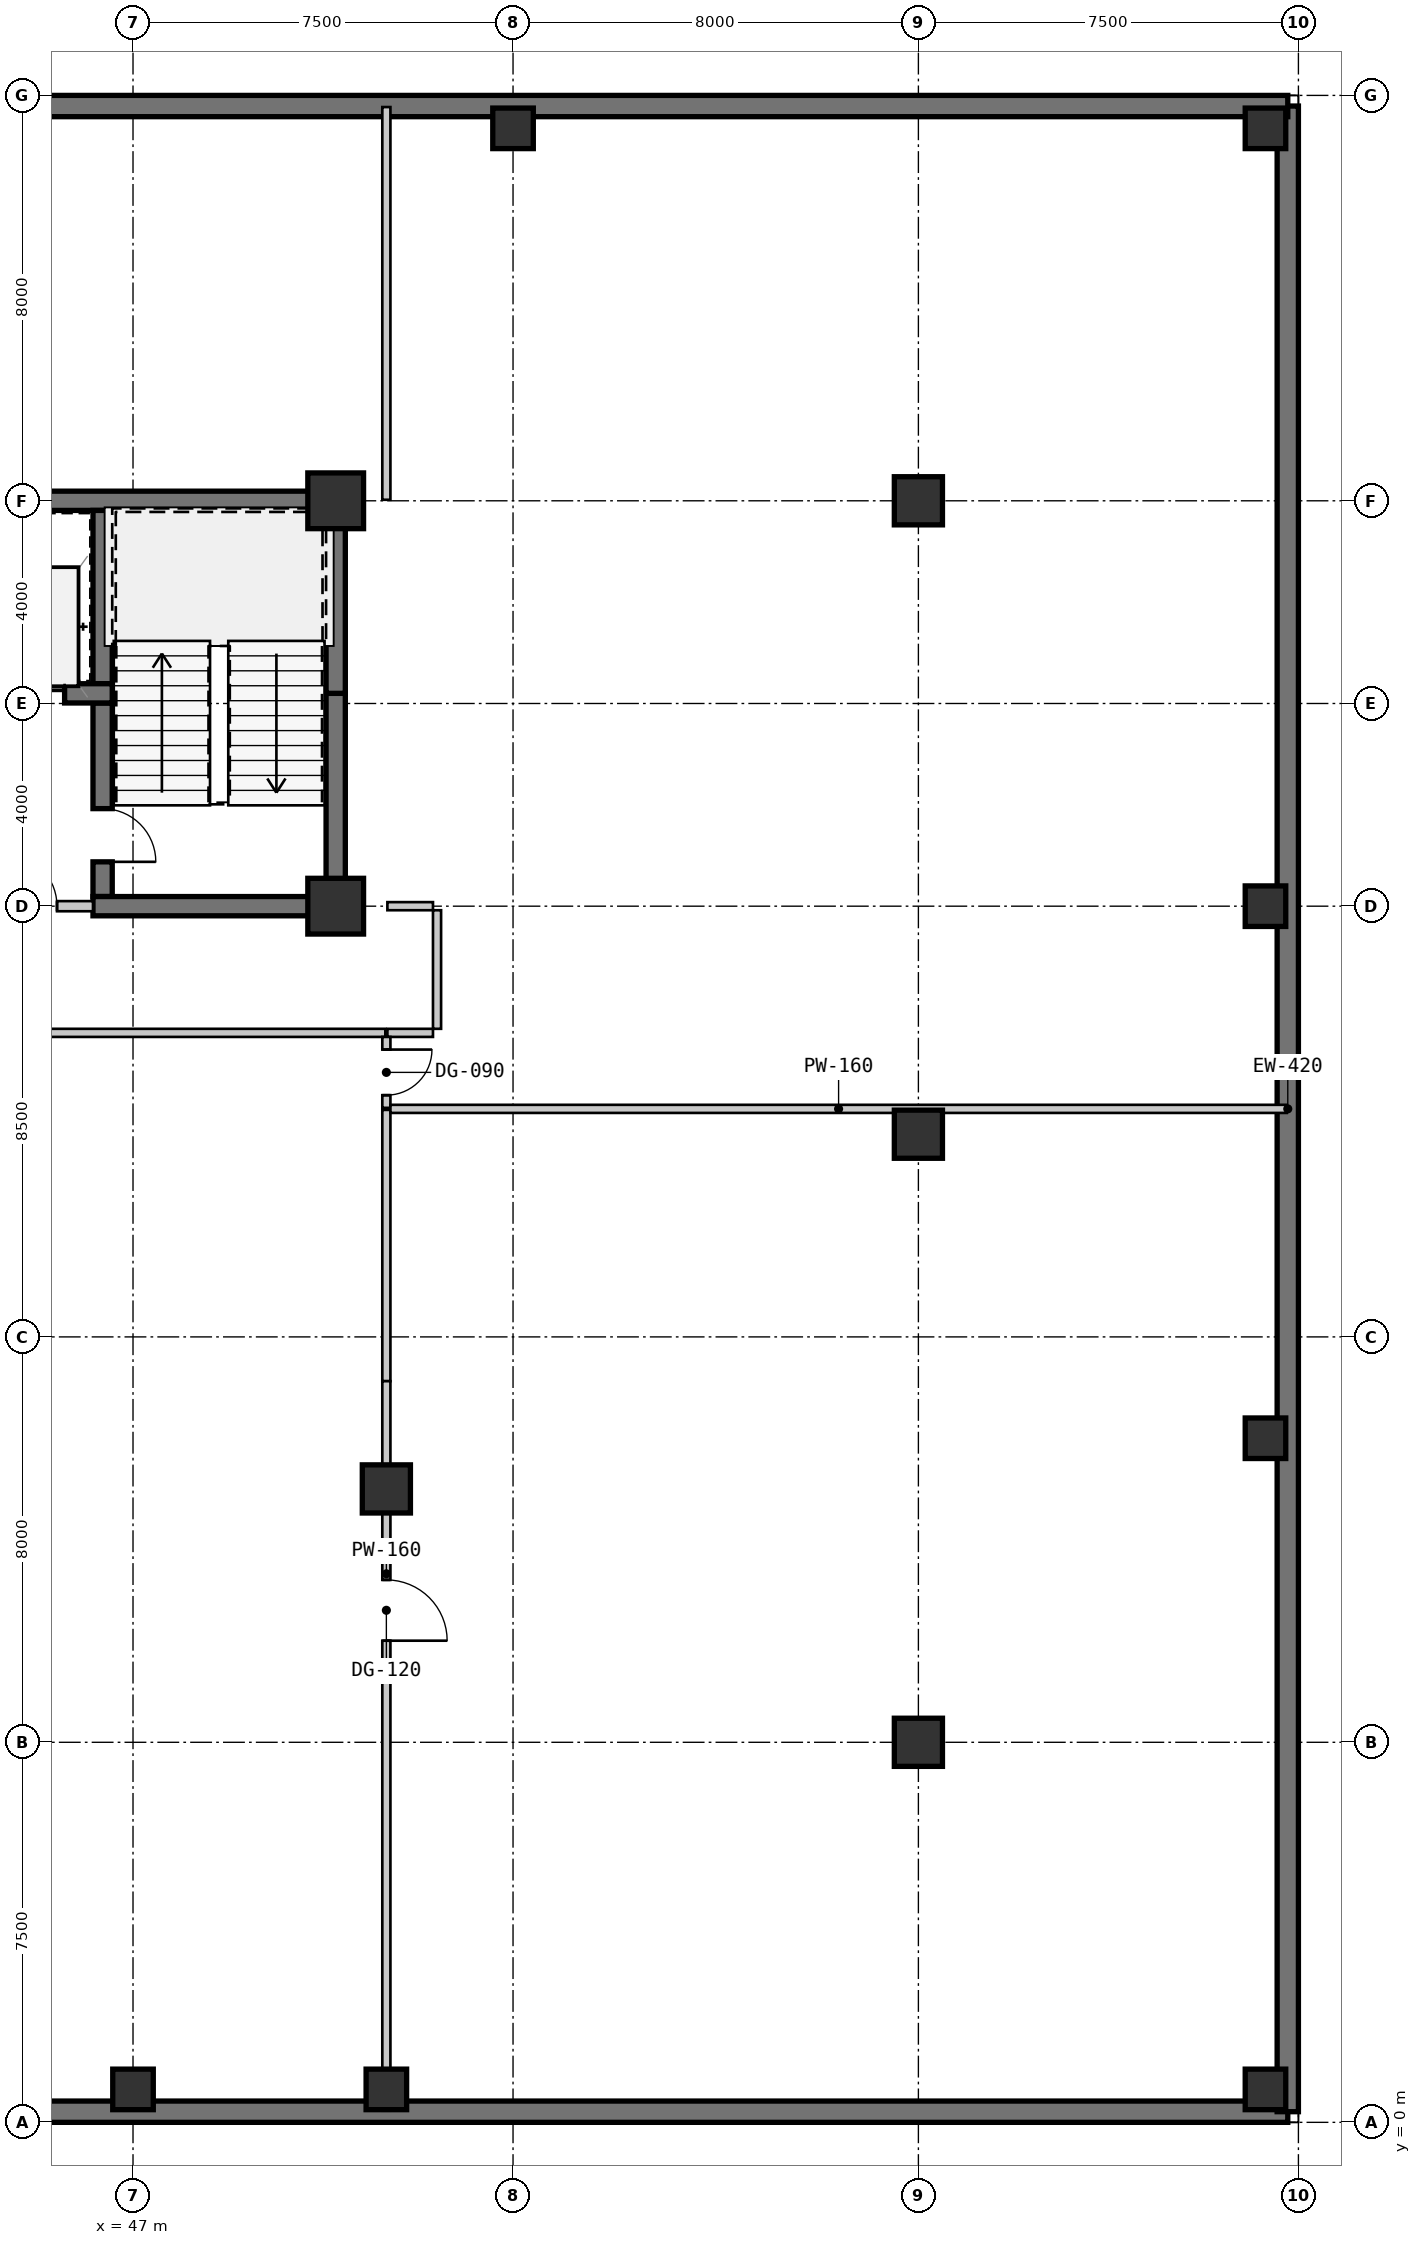
"""IFC4 building model, lengths in metres.
Left out: names, types, materials, properties, quantities, classifications, styles, units other than length and angle.
Written with IfcOpenShell. Run it as: python <this file> out.ifc"""

import sys

from ifc_helpers import new_model, si_unit, direction, frame, frame_2d, origin, origin_2d, place, context, subcontext, project, spatial, rectangle, extrude, source, transform, mapped, element, fill, save


model = new_model("IFC4")
c1 = context("Model", 3, precision=1e-05, world=origin(), true_north=direction((0.0, 1.0)))
c2 = subcontext(c1, "Body", "Model", "MODEL_VIEW")
j1 = project(units=[si_unit("LENGTHUNIT", "METRE"), si_unit("PLANEANGLEUNIT", "RADIAN")], contexts=[c1])
p1 = place(None, origin())
s1 = spatial("IfcSite", under=j1, at=p1, CompositionType="ELEMENT")
p2 = place(p1, origin())
s2 = spatial("IfcBuilding", under=s1, at=p2, CompositionType="ELEMENT")
p3 = place(p2, frame((0.0, 0.0, -4.0)))
s3 = spatial("IfcBuildingStorey", under=s2, at=p3, CompositionType="ELEMENT", Elevation=-4.0)
m1 = source(origin(), c2, "Body", "SweptSolid", [
    extrude(rectangle(XDim=1.1, YDim=1.1, at=origin_2d()), origin(), (0.0, 0.0, 1.0), 4.0),
])
for number, where, z_axis, x_axis in (
    (1, (51.0, 24.0, 0.0), (0.0, 0.0, 1.0), (1.0, 0.0, 0.0)),
    (2, (51.0, 32.0, 0.0), (0.0, 0.0, 1.0), (1.0, 0.0, 0.0)),
):
    element("IfcColumn", number, at=place(p3, frame(where, z_axis=z_axis, x_axis=x_axis)), inside=s3, PredefinedType="COLUMN", context=c2, shape_type="MappedRepresentation", body=[
        mapped(m1, transform((0.0, 0.0, 0.0), scale=1.0)),
    ])
m2 = source(origin(), c2, "Body", "SweptSolid", [
    extrude(rectangle(XDim=0.95, YDim=0.95, at=origin_2d()), origin(), (0.0, 0.0, 1.0), 4.0),
])
for number, where, z_axis, x_axis in (
    (3, (52.0, 12.5, 0.0), (0.0, 0.0, 1.0), (1.0, 0.0, 0.0)),
    (4, (62.5, 7.5, 0.0), (0.0, 0.0, 1.0), (1.0, 0.0, 0.0)),
    (5, (62.5, 19.5, 0.0), (0.0, 0.0, 1.0), (1.0, 0.0, 0.0)),
    (6, (62.5, 32.0, 0.0), (0.0, 0.0, 1.0), (1.0, 0.0, 0.0)),
):
    element("IfcColumn", number, at=place(p3, frame(where, z_axis=z_axis, x_axis=x_axis)), inside=s3, PredefinedType="COLUMN", context=c2, shape_type="MappedRepresentation", body=[
        mapped(m2, transform((0.0, 0.0, 0.0), scale=1.0)),
    ])
m3 = source(origin(), c2, "Body", "SweptSolid", [
    extrude(rectangle(XDim=0.8, YDim=0.8, at=origin_2d()), origin(), (0.0, 0.0, 1.0), 4.0),
])
for number, where, z_axis, x_axis in (
    (7, (69.35, 0.65, 0.0), (0.0, 0.0, 1.0), (1.0, 0.0, 0.0)),
    (8, (69.35, 13.5, 0.0), (0.0, 0.0, 1.0), (1.0, 0.0, 0.0)),
    (9, (69.35, 24.0, 0.0), (0.0, 0.0, 1.0), (1.0, 0.0, 0.0)),
    (10, (69.35, 39.35, 0.0), (0.0, 0.0, 1.0), (1.0, 0.0, 0.0)),
    (11, (47.0, 0.65, 0.0), (0.0, 0.0, 1.0), (1.0, 0.0, 0.0)),
    (12, (52.0, 0.65, 0.0), (0.0, 0.0, 1.0), (1.0, 0.0, 0.0)),
    (13, (54.5, 39.35, 0.0), (0.0, 0.0, 1.0), (1.0, 0.0, 0.0)),
):
    element("IfcColumn", number, at=place(p3, frame(where, z_axis=z_axis, x_axis=x_axis)), inside=s3, PredefinedType="COLUMN", context=c2, shape_type="MappedRepresentation", body=[
        mapped(m3, transform((0.0, 0.0, 0.0), scale=1.0)),
    ])
m4 = source(origin(), c2, "Body", "SweptSolid", [
    extrude(rectangle(XDim=69.58, YDim=0.42, at=frame_2d((34.79, 0.0))), origin(), (0.0, 0.0, 1.0), 3.74),
])
p4 = place(p3, frame((0.21, 0.21, 0.0), z_axis=(0.0, 0.0, 1.0), x_axis=(1.0, 0.0, 0.0)))
e14 = element("IfcWall", 14, at=p4, inside=s3, PredefinedType="SOLIDWALL", context=c2, shape_type="MappedRepresentation", body=[
    mapped(m4, transform((0.0, 0.0, 0.0), scale=1.0)),
])
m5 = source(origin(), c2, "Body", "SweptSolid", [
    extrude(rectangle(XDim=39.58, YDim=0.42, at=frame_2d((19.79, 0.0))), origin(), (0.0, 0.0, 1.0), 3.74),
])
p5 = place(p3, frame((69.79, 0.21, 0.0), z_axis=(0.0, 0.0, 1.0), x_axis=(0.0, 1.0, 0.0)))
e15 = element("IfcWall", 15, at=p5, inside=s3, PredefinedType="SOLIDWALL", context=c2, shape_type="MappedRepresentation", body=[
    mapped(m5, transform((0.0, 0.0, 0.0), scale=1.0)),
])
p6 = place(p3, frame((69.79, 39.79, 0.0), z_axis=(0.0, 0.0, 1.0), x_axis=(-1.0, 0.0, 0.0)))
e16 = element("IfcWall", 16, at=p6, inside=s3, PredefinedType="SOLIDWALL", context=c2, shape_type="MappedRepresentation", body=[
    mapped(m4, transform((0.0, 0.0, 0.0), scale=1.0)),
])
m6 = source(origin(), c2, "Body", "SweptSolid", [
    extrude(rectangle(XDim=11.99, YDim=0.38, at=frame_2d((5.995, 0.0))), origin(), (0.0, 0.0, 1.0), 3.74),
])
p7 = place(p3, frame((39.2, 32.0, 0.0), z_axis=(0.0, 0.0, 1.0), x_axis=(1.0, 0.0, 0.0)))
e17 = element("IfcWall", 17, at=p7, inside=s3, PredefinedType="SHEAR", context=c2, shape_type="MappedRepresentation", body=[
    mapped(m6, transform((0.0, 0.0, 0.0), scale=1.0)),
])
m7 = source(origin(), c2, "Body", "SweptSolid", [
    extrude(rectangle(XDim=4.01, YDim=0.38, at=frame_2d((2.005, 0.0))), origin(), (0.0, 0.0, 1.0), 3.74),
])
p8 = place(p3, frame((51.0, 24.19, 0.0), z_axis=(0.0, 0.0, 1.0), x_axis=(0.0, 1.0, 0.0)))
e18 = element("IfcWall", 18, at=p8, inside=s3, PredefinedType="SHEAR", context=c2, shape_type="MappedRepresentation", body=[
    mapped(m7, transform((0.0, 0.0, 0.0), scale=1.0)),
])
m8 = source(origin(), c2, "Body", "SweptSolid", [
    extrude(rectangle(XDim=3.61, YDim=0.38, at=frame_2d((1.805, 0.0))), origin(), (0.0, 0.0, 1.0), 3.74),
])
p9 = place(p3, frame((51.0, 28.2, 0.0), z_axis=(0.0, 0.0, 1.0), x_axis=(0.0, 1.0, 0.0)))
e19 = element("IfcWall", 19, at=p9, inside=s3, PredefinedType="SHEAR", context=c2, shape_type="MappedRepresentation", body=[
    mapped(m8, transform((0.0, 0.0, 0.0), scale=1.0)),
])
m9 = source(origin(), c2, "Body", "SweptSolid", [
    extrude(rectangle(XDim=3.42, YDim=0.38, at=frame_2d((1.71, 0.0))), origin(), (0.0, 0.0, 1.0), 3.74),
])
p10 = place(p3, frame((46.4, 31.81, 0.0), z_axis=(0.0, 0.0, 1.0), x_axis=(0.0, -1.0, 0.0)))
e20 = element("IfcWall", 20, at=p10, inside=s3, PredefinedType="SHEAR", context=c2, shape_type="MappedRepresentation", body=[
    mapped(m9, transform((0.0, 0.0, 0.0), scale=1.0)),
])
m10 = source(origin(), c2, "Body", "SweptSolid", [
    extrude(rectangle(XDim=3.82, YDim=0.38, at=frame_2d((1.91, 0.0))), origin(), (0.0, 0.0, 1.0), 3.74),
])
p11 = place(p3, frame((46.4, 28.01, 0.0), z_axis=(0.0, 0.0, 1.0), x_axis=(0.0, -1.0, 0.0)))
e21 = element("IfcWall", 21, at=p11, inside=s3, PredefinedType="SHEAR", context=c2, shape_type="MappedRepresentation", body=[
    mapped(m10, transform((0.0, 0.0, 0.0), scale=1.0)),
])
m11 = source(origin(), c2, "Body", "SweptSolid", [
    extrude(rectangle(XDim=1.05, YDim=2.1, at=frame_2d((0.525, 1.05))), frame((0.0, 0.2, 0.0), z_axis=(0.0, -1.0, 0.0), x_axis=(1.0, 0.0, 0.0)), (0.0, 0.0, 1.0), 0.4),
])
p12 = place(p11, frame((2.085, 0.0, 0.0)))
e22 = element("IfcOpeningElement", 22, at=p12, cuts=e21, PredefinedType="OPENING", context=c2, shape_type="MappedRepresentation", body=[
    mapped(m11, transform((0.0, 0.0, 0.0), scale=1.0)),
])
m12 = source(origin(), c2, "Body", "SweptSolid", [
    extrude(rectangle(XDim=4.98, YDim=0.38, at=frame_2d((2.49, 0.0))), origin(), (0.0, 0.0, 1.0), 3.74),
])
p13 = place(p3, frame((46.21, 24.0, 0.0), z_axis=(0.0, 0.0, 1.0), x_axis=(1.0, 0.0, 0.0)))
e23 = element("IfcWall", 23, at=p13, inside=s3, PredefinedType="SHEAR", context=c2, shape_type="MappedRepresentation", body=[
    mapped(m12, transform((0.0, 0.0, 0.0), scale=1.0)),
])
m13 = source(origin(), c2, "Body", "SweptSolid", [
    extrude(rectangle(XDim=2.98, YDim=0.38, at=frame_2d((1.49, 0.0))), origin(), (0.0, 0.0, 1.0), 3.74),
])
p14 = place(p3, frame((43.61, 28.2, 0.0), z_axis=(0.0, 0.0, 1.0), x_axis=(1.0, 0.0, 0.0)))
e24 = element("IfcWall", 24, at=p14, inside=s3, PredefinedType="SHEAR", context=c2, shape_type="MappedRepresentation", body=[
    mapped(m13, transform((0.0, 0.0, 0.0), scale=1.0)),
])
m14 = source(origin(), c2, "Body", "SweptSolid", [
    extrude(rectangle(XDim=1.1, YDim=2.15, at=frame_2d((0.55, 1.075))), frame((0.0, 0.2, 0.0), z_axis=(0.0, -1.0, 0.0), x_axis=(1.0, 0.0, 0.0)), (0.0, 0.0, 1.0), 0.4),
])
p15 = place(p14, frame((0.94, 0.0, 0.0)))
e25 = element("IfcOpeningElement", 25, at=p15, cuts=e24, PredefinedType="OPENING", context=c2, shape_type="MappedRepresentation", body=[
    mapped(m14, transform((0.0, 0.0, 0.0), scale=1.0)),
])
m15 = source(origin(), c2, "Body", "SweptSolid", [
    extrude(rectangle(XDim=2.66, YDim=0.2, at=frame_2d((1.33, 0.0))), origin(), (0.0, 0.0, 1.0), 3.207),
])
p16 = place(p3, frame((43.55, 24.0, 0.0), z_axis=(0.0, 0.0, 1.0), x_axis=(1.0, 0.0, 0.0)))
e26 = element("IfcWall", 26, at=p16, inside=s3, PredefinedType="SOLIDWALL", context=c2, shape_type="MappedRepresentation", body=[
    mapped(m15, transform((0.0, 0.0, 0.0), scale=1.0)),
])
m16 = source(origin(), c2, "Body", "SweptSolid", [
    extrude(rectangle(XDim=1.05, YDim=2.1, at=frame_2d((0.525, 1.05))), frame((0.0, 0.11, 0.0), z_axis=(0.0, -1.0, 0.0), x_axis=(1.0, 0.0, 0.0)), (0.0, 0.0, 1.0), 0.22),
])
p17 = place(p16, frame((0.9, 0.0, 0.0)))
e27 = element("IfcOpeningElement", 27, at=p17, cuts=e26, PredefinedType="OPENING", context=c2, shape_type="MappedRepresentation", body=[
    mapped(m16, transform((0.0, 0.0, 0.0), scale=1.0)),
])
m17 = source(origin(), c2, "Body", "SweptSolid", [
    extrude(rectangle(XDim=36.959, YDim=0.16, at=frame_2d((18.48, 0.0))), origin(), (0.0, 0.0, 1.0), 3.74),
])
p18 = place(p3, frame((51.98, 21.5, 0.0), z_axis=(0.0, 0.0, 1.0), x_axis=(-1.0, 0.0, 0.0)))
e28 = element("IfcWall", 28, at=p18, inside=s3, PredefinedType="PARTITIONING", context=c2, shape_type="MappedRepresentation", body=[
    mapped(m17, transform((0.0, 0.0, 0.0), scale=1.0)),
])
m18 = source(origin(), c2, "Body", "SweptSolid", [
    extrude(rectangle(XDim=1.05, YDim=2.1, at=frame_2d((0.525, 1.05))), frame((0.0, 0.09, 0.0), z_axis=(0.0, -1.0, 0.0), x_axis=(1.0, 0.0, 0.0)), (0.0, 0.0, 1.0), 0.18),
])
p19 = place(p18, frame((17.955, 0.0, 0.0)))
e29 = element("IfcOpeningElement", 29, at=p19, cuts=e28, PredefinedType="OPENING", context=c2, shape_type="MappedRepresentation", body=[
    mapped(m18, transform((0.0, 0.0, 0.0), scale=1.0)),
])
m19 = source(origin(), c2, "Body", "SweptSolid", [
    extrude(rectangle(XDim=2.34, YDim=0.16, at=frame_2d((1.17, 0.0))), origin(), (0.0, 0.0, 1.0), 3.74),
])
p20 = place(p3, frame((53.0, 23.92, 0.0), z_axis=(0.0, 0.0, 1.0), x_axis=(0.0, -1.0, 0.0)))
e30 = element("IfcWall", 30, at=p20, inside=s3, PredefinedType="PARTITIONING", context=c2, shape_type="MappedRepresentation", body=[
    mapped(m19, transform((0.0, 0.0, 0.0), scale=1.0)),
])
m20 = source(origin(), c2, "Body", "SweptSolid", [
    extrude(rectangle(XDim=0.9, YDim=0.16, at=frame_2d((0.45, 0.0))), origin(), (0.0, 0.0, 1.0), 3.74),
])
for number, where, z_axis, x_axis in (
    (31, (52.92, 21.5, 0.0), (0.0, 0.0, 1.0), (-1.0, 0.0, 0.0)),
    (32, (52.02, 24.0, 0.0), (0.0, 0.0, 1.0), (1.0, 0.0, 0.0)),
):
    element("IfcWall", number, at=place(p3, frame(where, z_axis=z_axis, x_axis=x_axis)), inside=s3, PredefinedType="PARTITIONING", context=c2, shape_type="MappedRepresentation", body=[
        mapped(m20, transform((0.0, 0.0, 0.0), scale=1.0)),
    ])
m21 = source(origin(), c2, "Body", "SweptSolid", [
    extrude(rectangle(XDim=5.354, YDim=0.16, at=frame_2d((2.677, 0.0))), origin(), (0.0, 0.0, 1.0), 3.74),
])
p21 = place(p3, frame((52.0, 19.98, 0.0), z_axis=(0.0, 0.0, 1.0), x_axis=(0.0, -1.0, 0.0)))
e33 = element("IfcWall", 33, at=p21, inside=s3, PredefinedType="PARTITIONING", context=c2, shape_type="MappedRepresentation", body=[
    mapped(m21, transform((0.0, 0.0, 0.0), scale=1.0)),
])
m22 = source(origin(), c2, "Body", "SweptSolid", [
    extrude(rectangle(XDim=13.976, YDim=0.16, at=frame_2d((6.988, 0.0))), origin(), (0.0, 0.0, 1.0), 3.207),
])
p22 = place(p3, frame((52.0, 14.626, 0.0), z_axis=(0.0, 0.0, 1.0), x_axis=(0.0, -1.0, 0.0)))
e34 = element("IfcWall", 34, at=p22, inside=s3, PredefinedType="PARTITIONING", context=c2, shape_type="MappedRepresentation", body=[
    mapped(m22, transform((0.0, 0.0, 0.0), scale=1.0)),
])
m23 = source(origin(), c2, "Body", "SweptSolid", [
    extrude(rectangle(XDim=1.2, YDim=2.1, at=frame_2d((0.6, 1.05))), frame((0.0, 0.09, 0.0), z_axis=(0.0, -1.0, 0.0), x_axis=(1.0, 0.0, 0.0)), (0.0, 0.0, 1.0), 0.18),
])
p23 = place(p22, frame((3.921, 0.0, 0.0)))
e35 = element("IfcOpeningElement", 35, at=p23, cuts=e34, PredefinedType="OPENING", context=c2, shape_type="MappedRepresentation", body=[
    mapped(m23, transform((0.0, 0.0, 0.0), scale=1.0)),
])
m24 = source(origin(), c2, "Body", "SweptSolid", [
    extrude(rectangle(XDim=0.42, YDim=0.16, at=frame_2d((0.21, 0.0))), origin(), (0.0, 0.0, 1.0), 3.74),
])
p24 = place(p3, frame((52.0, 0.65, 0.0), z_axis=(0.0, 0.0, 1.0), x_axis=(0.0, -1.0, 0.0)))
e36 = element("IfcWall", 36, at=p24, inside=s3, PredefinedType="PARTITIONING", context=c2, shape_type="MappedRepresentation", body=[
    mapped(m24, transform((0.0, 0.0, 0.0), scale=1.0)),
])
m25 = source(origin(), c2, "Body", "SweptSolid", [
    extrude(rectangle(XDim=1.4, YDim=0.16, at=frame_2d((0.7, 0.0))), origin(), (0.0, 0.0, 1.0), 3.74),
])
p25 = place(p3, frame((52.0, 21.42, 0.0), z_axis=(0.0, 0.0, 1.0), x_axis=(0.0, -1.0, 0.0)))
e37 = element("IfcWall", 37, at=p25, inside=s3, PredefinedType="PARTITIONING", context=c2, shape_type="MappedRepresentation", body=[
    mapped(m25, transform((0.0, 0.0, 0.0), scale=1.0)),
])
m26 = source(origin(), c2, "Body", "SweptSolid", [
    extrude(rectangle(XDim=0.9, YDim=2.1, at=frame_2d((0.45, 1.05))), frame((0.0, 0.09, 0.0), z_axis=(0.0, -1.0, 0.0), x_axis=(1.0, 0.0, 0.0)), (0.0, 0.0, 1.0), 0.18),
])
p26 = place(p25, frame((0.25, 0.0, 0.0)))
e38 = element("IfcOpeningElement", 38, at=p26, cuts=e37, PredefinedType="OPENING", context=c2, shape_type="MappedRepresentation", body=[
    mapped(m26, transform((0.0, 0.0, 0.0), scale=1.0)),
])
m27 = source(origin(), c2, "Body", "SweptSolid", [
    extrude(rectangle(XDim=17.69, YDim=0.16, at=frame_2d((8.845, 0.0))), origin(), (0.0, 0.0, 1.0), 3.74),
])
p27 = place(p3, frame((52.08, 20.0, 0.0), z_axis=(0.0, 0.0, 1.0), x_axis=(1.0, 0.0, 0.0)))
e39 = element("IfcWall", 39, at=p27, inside=s3, PredefinedType="PARTITIONING", context=c2, shape_type="MappedRepresentation", body=[
    mapped(m27, transform((0.0, 0.0, 0.0), scale=1.0)),
])
m28 = source(origin(), c2, "Body", "SweptSolid", [
    extrude(rectangle(XDim=7.75, YDim=0.16, at=frame_2d((3.875, 0.0))), origin(), (0.0, 0.0, 1.0), 3.74),
])
p28 = place(p3, frame((52.0, 32.02, 0.0), z_axis=(0.0, 0.0, 1.0), x_axis=(0.0, 1.0, 0.0)))
e40 = element("IfcWall", 40, at=p28, inside=s3, PredefinedType="PARTITIONING", context=c2, shape_type="MappedRepresentation", body=[
    mapped(m28, transform((0.0, 0.0, 0.0), scale=1.0)),
])
m29 = source(origin(), c2, "Body", "SweptSolid", [
    extrude(rectangle(XDim=1.05, YDim=2.1, at=frame_2d((0.525, 1.05))), frame((0.0, 0.025, 0.0), z_axis=(0.0, -1.0, 0.0), x_axis=(1.0, 0.0, 0.0)), (0.0, 0.0, 1.0), 0.05),
])
p29 = place(p12, origin())
e41 = element("IfcDoor", 41, at=p29, inside=s3, OperationType="SINGLE_SWING_RIGHT", PredefinedType="DOOR", context=c2, shape_type="MappedRepresentation", body=[
    mapped(m29, transform((0.0, 0.0, 0.0), scale=1.0)),
])
fill(e22, e41)
m30 = source(origin(), c2, "Body", "SweptSolid", [
    extrude(rectangle(XDim=1.1, YDim=2.15, at=frame_2d((0.55, 1.075))), frame((0.0, 0.025, 0.0), z_axis=(0.0, -1.0, 0.0), x_axis=(1.0, 0.0, 0.0)), (0.0, 0.0, 1.0), 0.05),
])
p30 = place(p15, origin())
e42 = element("IfcDoor", 42, at=p30, inside=s3, OperationType="SLIDING_TO_LEFT", PredefinedType="DOOR", context=c2, shape_type="MappedRepresentation", body=[
    mapped(m30, transform((0.0, 0.0, 0.0), scale=1.0)),
])
fill(e25, e42)
p31 = place(p17, origin())
e43 = element("IfcDoor", 43, at=p31, inside=s3, OperationType="SINGLE_SWING_LEFT", PredefinedType="DOOR", context=c2, shape_type="MappedRepresentation", body=[
    mapped(m29, transform((0.0, 0.0, 0.0), scale=1.0)),
])
fill(e27, e43)
m31 = source(origin(), c2, "Body", "SweptSolid", [
    extrude(rectangle(XDim=1.2, YDim=2.1, at=frame_2d((0.6, 1.05))), frame((0.0, 0.025, 0.0), z_axis=(0.0, -1.0, 0.0), x_axis=(1.0, 0.0, 0.0)), (0.0, 0.0, 1.0), 0.05),
])
p32 = place(p23, origin())
e44 = element("IfcDoor", 44, at=p32, inside=s3, OperationType="SINGLE_SWING_RIGHT", PredefinedType="GATE", context=c2, shape_type="MappedRepresentation", body=[
    mapped(m31, transform((0.0, 0.0, 0.0), scale=1.0)),
])
fill(e35, e44)
m32 = source(origin(), c2, "Body", "SweptSolid", [
    extrude(rectangle(XDim=0.9, YDim=2.1, at=frame_2d((0.45, 1.05))), frame((0.0, 0.025, 0.0), z_axis=(0.0, -1.0, 0.0), x_axis=(1.0, 0.0, 0.0)), (0.0, 0.0, 1.0), 0.05),
])
p33 = place(p26, origin())
e45 = element("IfcDoor", 45, at=p33, inside=s3, OperationType="SINGLE_SWING_LEFT", PredefinedType="GATE", context=c2, shape_type="MappedRepresentation", body=[
    mapped(m32, transform((0.0, 0.0, 0.0), scale=1.0)),
])
fill(e38, e45)
save(model, sys.argv[1])
